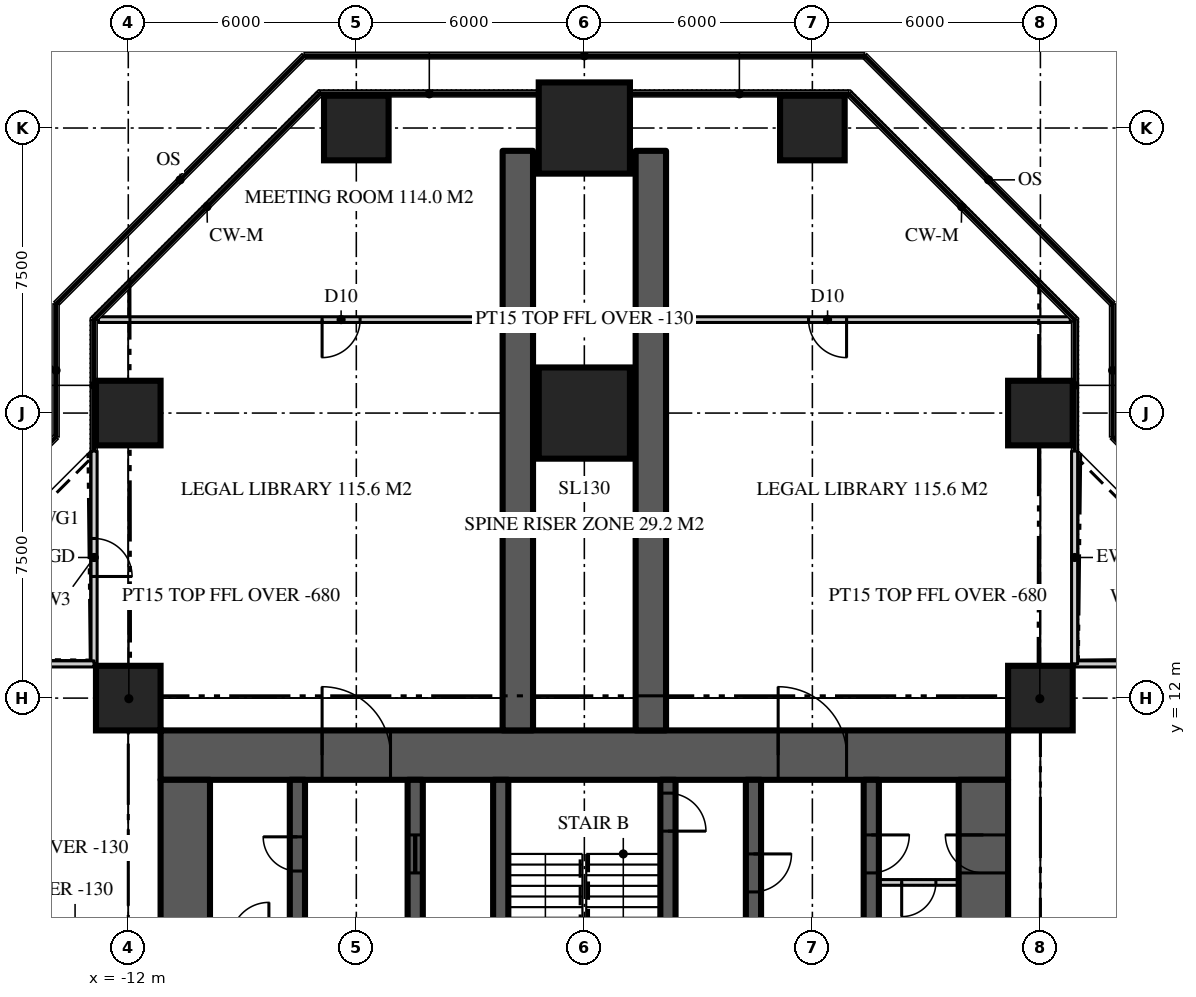
"""IFC4 building model, lengths in metres.
Left out: names, types, materials, properties, quantities, classifications, styles, units other than length and angle.
Written with IfcOpenShell. Run it as: python <this file> out.ifc"""

import sys

from ifc_helpers import new_model, si_unit, direction, frame, frame_2d, origin, origin_2d, place, context, subcontext, project, spatial, rectangle, extrude, element, fill, save


model = new_model("IFC4")
c1 = context("Model", 3, precision=1e-05, world=origin(), true_north=direction((0.0, 1.0)))
c2 = subcontext(c1, "Body", "Model", "MODEL_VIEW")
j1 = project(units=[si_unit("LENGTHUNIT", "METRE"), si_unit("PLANEANGLEUNIT", "RADIAN")], contexts=[c1])
p1 = place(None, origin())
s1 = spatial("IfcSite", under=j1, at=p1, CompositionType="ELEMENT")
p2 = place(p1, origin())
s2 = spatial("IfcBuilding", under=s1, at=p2, CompositionType="ELEMENT")
p3 = place(p2, frame((0.0, 0.0, 135.9)))
s3 = spatial("IfcBuildingStorey", under=s2, at=p3, CompositionType="ELEMENT", Elevation=135.9)
p4 = place(p3, frame((-11.15, 10.5, 0.0), z_axis=(0.0, 0.0, 1.0), x_axis=(1.0, 0.0, 0.0)))
e1 = element("IfcWall", 1, at=p4, inside=s3, PredefinedType="SHEAR", context=c2, shape_type="SweptSolid", body=[
    extrude(rectangle(XDim=22.3, YDim=1.3, at=frame_2d((11.15, 0.0))), origin(), (0.0, 0.0, 1.0), 3.9),
])
p5 = place(p4, frame((4.25, 0.0, 0.0)))
e2 = element("IfcOpeningElement", 2, at=p5, cuts=e1, PredefinedType="OPENING", context=c2, shape_type="SweptSolid", body=[
    extrude(rectangle(XDim=1.8, YDim=2.2, at=frame_2d((0.9, 1.1))), frame((0.0, 0.66, 0.0), z_axis=(0.0, -1.0, 0.0), x_axis=(1.0, 0.0, 0.0)), (0.0, 0.0, 1.0), 1.32),
])
p6 = place(p4, frame((16.25, 0.0, 0.0)))
e3 = element("IfcOpeningElement", 3, at=p6, cuts=e1, PredefinedType="OPENING", context=c2, shape_type="SweptSolid", body=[
    extrude(rectangle(XDim=1.8, YDim=2.2, at=frame_2d((0.9, 1.1))), frame((0.0, 0.66, 0.0), z_axis=(0.0, -1.0, 0.0), x_axis=(1.0, 0.0, 0.0)), (0.0, 0.0, 1.0), 1.32),
])
p7 = place(p3, frame((10.5, -9.85, 0.0), z_axis=(0.0, 0.0, 1.0), x_axis=(0.0, 1.0, 0.0)))
e4 = element("IfcWall", 4, at=p7, inside=s3, PredefinedType="SHEAR", context=c2, shape_type="SweptSolid", body=[
    extrude(rectangle(XDim=19.7, YDim=1.3, at=frame_2d((9.85, 0.0))), origin(), (0.0, 0.0, 1.0), 3.9),
])
p8 = place(p7, frame((17.25, 0.0, 0.0)))
e5 = element("IfcOpeningElement", 5, at=p8, cuts=e4, PredefinedType="OPENING", context=c2, shape_type="SweptSolid", body=[
    extrude(rectangle(XDim=1.0, YDim=2.2, at=frame_2d((0.5, 1.1))), frame((0.0, 0.66, 0.0), z_axis=(0.0, -1.0, 0.0), x_axis=(1.0, 0.0, 0.0)), (0.0, 0.0, 1.0), 1.32),
])
p9 = place(p3, frame((-10.5, 9.85, 0.0), z_axis=(0.0, 0.0, 1.0), x_axis=(0.0, -1.0, 0.0)))
e6 = element("IfcWall", 6, at=p9, inside=s3, PredefinedType="SHEAR", context=c2, shape_type="SweptSolid", body=[
    extrude(rectangle(XDim=19.7, YDim=1.3, at=frame_2d((9.85, 0.0))), origin(), (0.0, 0.0, 1.0), 3.9),
])
p10 = place(p9, frame((17.25, 0.0, 0.0)))
e7 = element("IfcOpeningElement", 7, at=p10, cuts=e6, PredefinedType="OPENING", context=c2, shape_type="SweptSolid", body=[
    extrude(rectangle(XDim=1.0, YDim=2.2, at=frame_2d((0.5, 1.1))), frame((0.0, 0.66, 0.0), z_axis=(0.0, -1.0, 0.0), x_axis=(1.0, 0.0, 0.0)), (0.0, 0.0, 1.0), 1.32),
])
for number, where, z_axis, x_axis in (
    (8, (1.75, 11.15, 0.0), (0.0, 0.0, 1.0), (0.0, 1.0, 0.0)),
    (9, (-1.75, 11.15, 0.0), (0.0, 0.0, 1.0), (0.0, 1.0, 0.0)),
):
    element("IfcWall", number, at=place(p3, frame(where, z_axis=z_axis, x_axis=x_axis)), inside=s3, PredefinedType="SHEAR", context=c2, shape_type="SweptSolid", body=[
        extrude(rectangle(XDim=15.25, YDim=0.8, at=frame_2d((7.625, 0.0))), origin(), (0.0, 0.0, 1.0), 3.9),
    ])
for number, where, z_axis, x_axis in (
    (10, (-12.0, 12.0, 0.0), (0.0, 0.0, 1.0), (1.0, 0.0, 0.0)),
    (11, (12.0, 12.0, 0.0), (0.0, 0.0, 1.0), (1.0, 0.0, 0.0)),
    (12, (-12.0, 19.5, 0.0), (0.0, 0.0, 1.0), (1.0, 0.0, 0.0)),
):
    element("IfcColumn", number, at=place(p3, frame(where, z_axis=z_axis, x_axis=x_axis)), inside=s3, PredefinedType="COLUMN", context=c2, shape_type="SweptSolid", body=[
        extrude(rectangle(XDim=1.7, YDim=1.7, at=origin_2d()), origin(), (0.0, 0.0, 1.0), 3.9),
    ])
p11 = place(p3, frame((0.0, 19.5, 0.0), z_axis=(0.0, 0.0, 1.0), x_axis=(1.0, 0.0, 0.0)))
e13 = element("IfcColumn", 13, at=p11, inside=s3, PredefinedType="COLUMN", context=c2, shape_type="SweptSolid", body=[
    extrude(rectangle(XDim=2.4, YDim=2.4, at=origin_2d()), origin(), (0.0, 0.0, 1.0), 3.9),
])
for number, where, z_axis, x_axis in (
    (14, (12.0, 19.5, 0.0), (0.0, 0.0, 1.0), (1.0, 0.0, 0.0)),
    (15, (-6.0, 27.0, 0.0), (0.0, 0.0, 1.0), (1.0, 0.0, 0.0)),
):
    element("IfcColumn", number, at=place(p3, frame(where, z_axis=z_axis, x_axis=x_axis)), inside=s3, PredefinedType="COLUMN", context=c2, shape_type="SweptSolid", body=[
        extrude(rectangle(XDim=1.7, YDim=1.7, at=origin_2d()), origin(), (0.0, 0.0, 1.0), 3.9),
    ])
p12 = place(p3, frame((0.0, 27.0, 0.0), z_axis=(0.0, 0.0, 1.0), x_axis=(1.0, 0.0, 0.0)))
e16 = element("IfcColumn", 16, at=p12, inside=s3, PredefinedType="COLUMN", context=c2, shape_type="SweptSolid", body=[
    extrude(rectangle(XDim=2.4, YDim=2.4, at=origin_2d()), origin(), (0.0, 0.0, 1.0), 3.9),
])
p13 = place(p3, frame((6.0, 27.0, 0.0), z_axis=(0.0, 0.0, 1.0), x_axis=(1.0, 0.0, 0.0)))
e17 = element("IfcColumn", 17, at=p13, inside=s3, PredefinedType="COLUMN", context=c2, shape_type="SweptSolid", body=[
    extrude(rectangle(XDim=1.7, YDim=1.7, at=origin_2d()), origin(), (0.0, 0.0, 1.0), 3.9),
])
p14 = place(p3, frame((18.5, 12.9, 0.0), z_axis=(0.0, 0.0, 1.0), x_axis=(-1.0, 0.0, 0.0)))
e18 = element("IfcWall", 18, at=p14, inside=s3, PredefinedType="SOLIDWALL", context=c2, shape_type="SweptSolid", body=[
    extrude(rectangle(XDim=5.6, YDim=0.16, at=frame_2d((2.8, 0.0))), origin(), (0.0, 0.0, 1.0), 3.77),
])
p15 = place(p14, frame((2.3, 0.0, 0.0)))
e19 = element("IfcOpeningElement", 19, at=p15, cuts=e18, PredefinedType="OPENING", context=c2, shape_type="SweptSolid", body=[
    extrude(rectangle(XDim=1.0, YDim=2.2, at=frame_2d((0.5, 1.1))), frame((0.0, 0.09, 0.0), z_axis=(0.0, -1.0, 0.0), x_axis=(1.0, 0.0, 0.0)), (0.0, 0.0, 1.0), 0.18),
])
p16 = place(p3, frame((12.9, 12.9, 0.0), z_axis=(0.0, 0.0, 1.0), x_axis=(0.0, 1.0, 0.0)))
e20 = element("IfcWall", 20, at=p16, inside=s3, PredefinedType="SOLIDWALL", context=c2, shape_type="SweptSolid", body=[
    extrude(rectangle(XDim=5.6, YDim=0.16, at=frame_2d((2.8, 0.0))), origin(), (0.0, 0.0, 1.0), 3.77),
])
p17 = place(p3, frame((-12.9, 18.5, 0.0), z_axis=(0.0, 0.0, 1.0), x_axis=(0.0, -1.0, 0.0)))
e21 = element("IfcWall", 21, at=p17, inside=s3, PredefinedType="SOLIDWALL", context=c2, shape_type="SweptSolid", body=[
    extrude(rectangle(XDim=5.6, YDim=0.16, at=frame_2d((2.8, 0.0))), origin(), (0.0, 0.0, 1.0), 3.77),
])
p18 = place(p17, frame((2.3, 0.0, 0.0)))
e22 = element("IfcOpeningElement", 22, at=p18, cuts=e21, PredefinedType="OPENING", context=c2, shape_type="SweptSolid", body=[
    extrude(rectangle(XDim=1.0, YDim=2.2, at=frame_2d((0.5, 1.1))), frame((0.0, 0.09, 0.0), z_axis=(0.0, -1.0, 0.0), x_axis=(1.0, 0.0, 0.0)), (0.0, 0.0, 1.0), 0.18),
])
p19 = place(p3, frame((-12.9, 12.9, 0.0), z_axis=(0.0, 0.0, 1.0), x_axis=(-1.0, 0.0, 0.0)))
e23 = element("IfcWall", 23, at=p19, inside=s3, PredefinedType="SOLIDWALL", context=c2, shape_type="SweptSolid", body=[
    extrude(rectangle(XDim=5.6, YDim=0.16, at=frame_2d((2.8, 0.0))), origin(), (0.0, 0.0, 1.0), 3.77),
])
p20 = place(p3, frame((-7.55, -9.85, 0.0), z_axis=(0.0, 0.0, 1.0), x_axis=(0.0, 1.0, 0.0)))
e24 = element("IfcWall", 24, at=p20, inside=s3, PredefinedType="SHEAR", context=c2, shape_type="SweptSolid", body=[
    extrude(rectangle(XDim=19.7, YDim=0.4, at=frame_2d((9.85, 0.0))), origin(), (0.0, 0.0, 1.0), 3.9),
])
p21 = place(p20, frame((1.45, 0.0, 0.0)))
e25 = element("IfcOpeningElement", 25, at=p21, cuts=e24, PredefinedType="OPENING", context=c2, shape_type="SweptSolid", body=[
    extrude(rectangle(XDim=1.0, YDim=2.2, at=frame_2d((0.5, 1.1))), frame((0.0, 0.21, 0.0), z_axis=(0.0, -1.0, 0.0), x_axis=(1.0, 0.0, 0.0)), (0.0, 0.0, 1.0), 0.42),
])
p22 = place(p20, frame((17.3, 0.0, 0.0)))
e26 = element("IfcOpeningElement", 26, at=p22, cuts=e24, PredefinedType="OPENING", context=c2, shape_type="SweptSolid", body=[
    extrude(rectangle(XDim=0.9, YDim=2.1, at=frame_2d((0.45, 1.05))), frame((0.0, 0.21, 0.0), z_axis=(0.0, -1.0, 0.0), x_axis=(1.0, 0.0, 0.0)), (0.0, 0.0, 1.0), 0.42),
])
p23 = place(p3, frame((7.55, 9.85, 0.0), z_axis=(0.0, 0.0, 1.0), x_axis=(0.0, -1.0, 0.0)))
e27 = element("IfcWall", 27, at=p23, inside=s3, PredefinedType="SHEAR", context=c2, shape_type="SweptSolid", body=[
    extrude(rectangle(XDim=19.7, YDim=0.4, at=frame_2d((9.85, 0.0))), origin(), (0.0, 0.0, 1.0), 3.9),
])
p24 = place(p23, frame((1.45, 0.0, 0.0)))
e28 = element("IfcOpeningElement", 28, at=p24, cuts=e27, PredefinedType="OPENING", context=c2, shape_type="SweptSolid", body=[
    extrude(rectangle(XDim=1.0, YDim=2.2, at=frame_2d((0.5, 1.1))), frame((0.0, 0.21, 0.0), z_axis=(0.0, -1.0, 0.0), x_axis=(1.0, 0.0, 0.0)), (0.0, 0.0, 1.0), 0.42),
])
p25 = place(p23, frame((17.3, 0.0, 0.0)))
e29 = element("IfcOpeningElement", 29, at=p25, cuts=e27, PredefinedType="OPENING", context=c2, shape_type="SweptSolid", body=[
    extrude(rectangle(XDim=0.9, YDim=2.1, at=frame_2d((0.45, 1.05))), frame((0.0, 0.21, 0.0), z_axis=(0.0, -1.0, 0.0), x_axis=(1.0, 0.0, 0.0)), (0.0, 0.0, 1.0), 0.42),
])
p26 = place(p3, frame((-4.45, -9.85, 0.0), z_axis=(0.0, 0.0, 1.0), x_axis=(0.0, 1.0, 0.0)))
e30 = element("IfcWall", 30, at=p26, inside=s3, PredefinedType="SHEAR", context=c2, shape_type="SweptSolid", body=[
    extrude(rectangle(XDim=19.7, YDim=0.4, at=frame_2d((9.85, 0.0))), origin(), (0.0, 0.0, 1.0), 3.9),
])
p27 = place(p26, frame((1.95, 0.0, 0.0)))
e31 = element("IfcOpeningElement", 31, at=p27, cuts=e30, PredefinedType="OPENING", context=c2, shape_type="SweptSolid", body=[
    extrude(rectangle(XDim=1.0, YDim=2.2, at=frame_2d((0.5, 1.1))), frame((0.0, 0.21, 0.0), z_axis=(0.0, -1.0, 0.0), x_axis=(1.0, 0.0, 0.0)), (0.0, 0.0, 1.0), 0.42),
])
p28 = place(p26, frame((17.25, 0.0, 0.0)))
e32 = element("IfcOpeningElement", 32, at=p28, cuts=e30, PredefinedType="OPENING", context=c2, shape_type="SweptSolid", body=[
    extrude(rectangle(XDim=1.0, YDim=2.1, at=frame_2d((0.5, 1.05))), frame((0.0, 0.21, 0.0), z_axis=(0.0, -1.0, 0.0), x_axis=(1.0, 0.0, 0.0)), (0.0, 0.0, 1.0), 0.42),
])
p29 = place(p26, frame((7.925, 0.0, 0.0)))
e33 = element("IfcOpeningElement", 33, at=p29, cuts=e30, PredefinedType="OPENING", context=c2, shape_type="SweptSolid", body=[
    extrude(rectangle(XDim=1.1, YDim=2.2, at=frame_2d((0.55, 1.1))), frame((0.0, 0.21, 0.0), z_axis=(0.0, -1.0, 0.0), x_axis=(1.0, 0.0, 0.0)), (0.0, 0.0, 1.0), 0.42),
])
p30 = place(p26, frame((10.675, 0.0, 0.0)))
e34 = element("IfcOpeningElement", 34, at=p30, cuts=e30, PredefinedType="OPENING", context=c2, shape_type="SweptSolid", body=[
    extrude(rectangle(XDim=1.1, YDim=2.2, at=frame_2d((0.55, 1.1))), frame((0.0, 0.21, 0.0), z_axis=(0.0, -1.0, 0.0), x_axis=(1.0, 0.0, 0.0)), (0.0, 0.0, 1.0), 0.42),
])
p31 = place(p26, frame((13.475, 0.0, 0.0)))
e35 = element("IfcOpeningElement", 35, at=p31, cuts=e30, PredefinedType="OPENING", context=c2, shape_type="SweptSolid", body=[
    extrude(rectangle(XDim=1.1, YDim=2.2, at=frame_2d((0.55, 1.1))), frame((0.0, 0.21, 0.0), z_axis=(0.0, -1.0, 0.0), x_axis=(1.0, 0.0, 0.0)), (0.0, 0.0, 1.0), 0.42),
])
p32 = place(p3, frame((4.45, 9.85, 0.0), z_axis=(0.0, 0.0, 1.0), x_axis=(0.0, -1.0, 0.0)))
e36 = element("IfcWall", 36, at=p32, inside=s3, PredefinedType="SHEAR", context=c2, shape_type="SweptSolid", body=[
    extrude(rectangle(XDim=19.7, YDim=0.4, at=frame_2d((9.85, 0.0))), origin(), (0.0, 0.0, 1.0), 3.9),
])
p33 = place(p32, frame((1.95, 0.0, 0.0)))
e37 = element("IfcOpeningElement", 37, at=p33, cuts=e36, PredefinedType="OPENING", context=c2, shape_type="SweptSolid", body=[
    extrude(rectangle(XDim=1.0, YDim=2.2, at=frame_2d((0.5, 1.1))), frame((0.0, 0.21, 0.0), z_axis=(0.0, -1.0, 0.0), x_axis=(1.0, 0.0, 0.0)), (0.0, 0.0, 1.0), 0.42),
])
p34 = place(p32, frame((17.3, 0.0, 0.0)))
e38 = element("IfcOpeningElement", 38, at=p34, cuts=e36, PredefinedType="OPENING", context=c2, shape_type="SweptSolid", body=[
    extrude(rectangle(XDim=0.9, YDim=2.1, at=frame_2d((0.45, 1.05))), frame((0.0, 0.21, 0.0), z_axis=(0.0, -1.0, 0.0), x_axis=(1.0, 0.0, 0.0)), (0.0, 0.0, 1.0), 0.42),
])
p35 = place(p3, frame((-2.2, -9.85, 0.0), z_axis=(0.0, 0.0, 1.0), x_axis=(0.0, 1.0, 0.0)))
e39 = element("IfcWall", 39, at=p35, inside=s3, PredefinedType="SHEAR", context=c2, shape_type="SweptSolid", body=[
    extrude(rectangle(XDim=19.7, YDim=0.4, at=frame_2d((9.85, 0.0))), origin(), (0.0, 0.0, 1.0), 3.9),
])
p36 = place(p35, frame((0.35, 0.0, 0.0)))
e40 = element("IfcOpeningElement", 40, at=p36, cuts=e39, PredefinedType="OPENING", context=c2, shape_type="SweptSolid", body=[
    extrude(rectangle(XDim=1.0, YDim=2.2, at=frame_2d((0.5, 1.1))), frame((0.0, 0.21, 0.0), z_axis=(0.0, -1.0, 0.0), x_axis=(1.0, 0.0, 0.0)), (0.0, 0.0, 1.0), 0.42),
])
p37 = place(p3, frame((2.2, 9.85, 0.0), z_axis=(0.0, 0.0, 1.0), x_axis=(0.0, -1.0, 0.0)))
e41 = element("IfcWall", 41, at=p37, inside=s3, PredefinedType="SHEAR", context=c2, shape_type="SweptSolid", body=[
    extrude(rectangle(XDim=19.7, YDim=0.4, at=frame_2d((9.85, 0.0))), origin(), (0.0, 0.0, 1.0), 3.9),
])
p38 = place(p37, frame((0.35, 0.0, 0.0)))
e42 = element("IfcOpeningElement", 42, at=p38, cuts=e41, PredefinedType="OPENING", context=c2, shape_type="SweptSolid", body=[
    extrude(rectangle(XDim=1.0, YDim=2.2, at=frame_2d((0.5, 1.1))), frame((0.0, 0.21, 0.0), z_axis=(0.0, -1.0, 0.0), x_axis=(1.0, 0.0, 0.0)), (0.0, 0.0, 1.0), 0.42),
])
p39 = place(p3, frame((12.786, 21.959, 0.0), z_axis=(0.0, 0.0, 1.0), x_axis=(-1.0, 0.0, 0.0)))
e43 = element("IfcWall", 43, at=p39, inside=s3, PredefinedType="PARTITIONING", context=c2, shape_type="SweptSolid", body=[
    extrude(rectangle(XDim=25.573, YDim=0.15, at=frame_2d((12.786, 0.0))), origin(), (0.0, 0.0, 1.0), 3.77),
])
p40 = place(p39, frame((18.687, 0.0, 0.0)))
e44 = element("IfcOpeningElement", 44, at=p40, cuts=e43, PredefinedType="OPENING", context=c2, shape_type="SweptSolid", body=[
    extrude(rectangle(XDim=1.0, YDim=2.2, at=frame_2d((0.5, 1.1))), frame((0.0, 0.085, 0.0), z_axis=(0.0, -1.0, 0.0), x_axis=(1.0, 0.0, 0.0)), (0.0, 0.0, 1.0), 0.17),
])
p41 = place(p39, frame((5.886, 0.0, 0.0)))
e45 = element("IfcOpeningElement", 45, at=p41, cuts=e43, PredefinedType="OPENING", context=c2, shape_type="SweptSolid", body=[
    extrude(rectangle(XDim=1.0, YDim=2.2, at=frame_2d((0.5, 1.1))), frame((0.0, 0.085, 0.0), z_axis=(0.0, -1.0, 0.0), x_axis=(1.0, 0.0, 0.0)), (0.0, 0.0, 1.0), 0.17),
])
for number, where, z_axis, x_axis in (
    (46, (11.15, 11.15, 0.0), (0.0, 0.0, 1.0), (0.707, 0.707, 0.0)),
    (47, (-11.15, 11.15, 0.0), (0.0, 0.0, 1.0), (-0.707, 0.707, 0.0)),
):
    element("IfcWall", number, at=place(p3, frame(where, z_axis=z_axis, x_axis=x_axis)), inside=s3, PredefinedType="PARTITIONING", context=c2, shape_type="SweptSolid", body=[
        extrude(rectangle(XDim=2.362, YDim=0.15, at=frame_2d((1.181, 0.0))), origin(), (0.0, 0.0, 1.0), 3.22),
    ])
p42 = place(p3, frame((9.85, 7.15, 0.0), z_axis=(0.0, 0.0, 1.0), x_axis=(-1.0, 0.0, 0.0)))
e48 = element("IfcWall", 48, at=p42, inside=s3, PredefinedType="SOLIDWALL", context=c2, shape_type="SweptSolid", body=[
    extrude(rectangle(XDim=2.1, YDim=0.15, at=frame_2d((1.05, 0.0))), origin(), (0.0, 0.0, 1.0), 3.77),
])
p43 = place(p42, frame((0.6, 0.0, 0.0)))
e49 = element("IfcOpeningElement", 49, at=p43, cuts=e48, PredefinedType="OPENING", context=c2, shape_type="SweptSolid", body=[
    extrude(rectangle(XDim=0.9, YDim=2.1, at=frame_2d((0.45, 1.05))), frame((0.0, 0.085, 0.0), z_axis=(0.0, -1.0, 0.0), x_axis=(1.0, 0.0, 0.0)), (0.0, 0.0, 1.0), 0.17),
])
p44 = place(p18, origin())
e50 = element("IfcDoor", 50, at=p44, inside=s3, OperationType="SINGLE_SWING_RIGHT", PredefinedType="DOOR", context=c2, shape_type="SweptSolid", body=[
    extrude(rectangle(XDim=1.0, YDim=2.2, at=frame_2d((0.5, 1.1))), frame((0.0, 0.025, 0.0), z_axis=(0.0, -1.0, 0.0), x_axis=(1.0, 0.0, 0.0)), (0.0, 0.0, 1.0), 0.05),
])
fill(e22, e50)
p45 = place(p5, origin())
e51 = element("IfcDoor", 51, at=p45, inside=s3, OperationType="DOUBLE_DOOR_DOUBLE_SWING", PredefinedType="DOOR", context=c2, shape_type="SweptSolid", body=[
    extrude(rectangle(XDim=1.8, YDim=2.2, at=frame_2d((0.9, 1.1))), frame((0.0, 0.025, 0.0), z_axis=(0.0, -1.0, 0.0), x_axis=(1.0, 0.0, 0.0)), (0.0, 0.0, 1.0), 0.05),
])
fill(e2, e51)
p46 = place(p6, origin())
e52 = element("IfcDoor", 52, at=p46, inside=s3, OperationType="DOUBLE_DOOR_DOUBLE_SWING", PredefinedType="DOOR", context=c2, shape_type="SweptSolid", body=[
    extrude(rectangle(XDim=1.8, YDim=2.2, at=frame_2d((0.9, 1.1))), frame((0.0, 0.025, 0.0), z_axis=(0.0, -1.0, 0.0), x_axis=(1.0, 0.0, 0.0)), (0.0, 0.0, 1.0), 0.05),
])
fill(e3, e52)
p47 = place(p24, origin())
e53 = element("IfcDoor", 53, at=p47, inside=s3, OperationType="SINGLE_SWING_LEFT", PredefinedType="DOOR", context=c2, shape_type="SweptSolid", body=[
    extrude(rectangle(XDim=1.0, YDim=2.2, at=frame_2d((0.5, 1.1))), frame((0.0, 0.025, 0.0), z_axis=(0.0, -1.0, 0.0), x_axis=(1.0, 0.0, 0.0)), (0.0, 0.0, 1.0), 0.05),
])
fill(e28, e53)
p48 = place(p8, origin())
e54 = element("IfcDoor", 54, at=p48, inside=s3, OperationType="SINGLE_SWING_RIGHT", PredefinedType="DOOR", context=c2, shape_type="SweptSolid", body=[
    extrude(rectangle(XDim=1.0, YDim=2.2, at=frame_2d((0.5, 1.1))), frame((0.0, 0.025, 0.0), z_axis=(0.0, -1.0, 0.0), x_axis=(1.0, 0.0, 0.0)), (0.0, 0.0, 1.0), 0.05),
])
fill(e5, e54)
p49 = place(p33, origin())
e55 = element("IfcDoor", 55, at=p49, inside=s3, OperationType="SINGLE_SWING_LEFT", PredefinedType="DOOR", context=c2, shape_type="SweptSolid", body=[
    extrude(rectangle(XDim=1.0, YDim=2.2, at=frame_2d((0.5, 1.1))), frame((0.0, 0.025, 0.0), z_axis=(0.0, -1.0, 0.0), x_axis=(1.0, 0.0, 0.0)), (0.0, 0.0, 1.0), 0.05),
])
fill(e37, e55)
p50 = place(p38, origin())
e56 = element("IfcDoor", 56, at=p50, inside=s3, OperationType="SINGLE_SWING_RIGHT", PredefinedType="DOOR", context=c2, shape_type="SweptSolid", body=[
    extrude(rectangle(XDim=1.0, YDim=2.2, at=frame_2d((0.5, 1.1))), frame((0.0, 0.025, 0.0), z_axis=(0.0, -1.0, 0.0), x_axis=(1.0, 0.0, 0.0)), (0.0, 0.0, 1.0), 0.05),
])
fill(e42, e56)
p51 = place(p22, origin())
e57 = element("IfcDoor", 57, at=p51, inside=s3, OperationType="SINGLE_SWING_RIGHT", PredefinedType="DOOR", context=c2, shape_type="SweptSolid", body=[
    extrude(rectangle(XDim=0.9, YDim=2.1, at=frame_2d((0.45, 1.05))), frame((0.0, 0.025, 0.0), z_axis=(0.0, -1.0, 0.0), x_axis=(1.0, 0.0, 0.0)), (0.0, 0.0, 1.0), 0.05),
])
fill(e26, e57)
p52 = place(p28, origin())
e58 = element("IfcDoor", 58, at=p52, inside=s3, OperationType="SLIDING_TO_LEFT", PredefinedType="DOOR", context=c2, shape_type="SweptSolid", body=[
    extrude(rectangle(XDim=1.0, YDim=2.1, at=frame_2d((0.5, 1.05))), frame((0.0, 0.025, 0.0), z_axis=(0.0, -1.0, 0.0), x_axis=(1.0, 0.0, 0.0)), (0.0, 0.0, 1.0), 0.05),
])
fill(e32, e58)
p53 = place(p40, origin())
e59 = element("IfcDoor", 59, at=p53, inside=s3, OperationType="SINGLE_SWING_RIGHT", PredefinedType="DOOR", context=c2, shape_type="SweptSolid", body=[
    extrude(rectangle(XDim=1.0, YDim=2.2, at=frame_2d((0.5, 1.1))), frame((0.0, 0.025, 0.0), z_axis=(0.0, -1.0, 0.0), x_axis=(1.0, 0.0, 0.0)), (0.0, 0.0, 1.0), 0.05),
])
fill(e44, e59)
p54 = place(p41, origin())
e60 = element("IfcDoor", 60, at=p54, inside=s3, OperationType="SINGLE_SWING_LEFT", PredefinedType="DOOR", context=c2, shape_type="SweptSolid", body=[
    extrude(rectangle(XDim=1.0, YDim=2.2, at=frame_2d((0.5, 1.1))), frame((0.0, 0.025, 0.0), z_axis=(0.0, -1.0, 0.0), x_axis=(1.0, 0.0, 0.0)), (0.0, 0.0, 1.0), 0.05),
])
fill(e45, e60)
p55 = place(p43, origin())
e61 = element("IfcDoor", 61, at=p55, inside=s3, OperationType="SINGLE_SWING_RIGHT", PredefinedType="DOOR", context=c2, shape_type="SweptSolid", body=[
    extrude(rectangle(XDim=0.9, YDim=2.1, at=frame_2d((0.45, 1.05))), frame((0.0, 0.025, 0.0), z_axis=(0.0, -1.0, 0.0), x_axis=(1.0, 0.0, 0.0)), (0.0, 0.0, 1.0), 0.05),
])
fill(e49, e61)
save(model, sys.argv[1])
